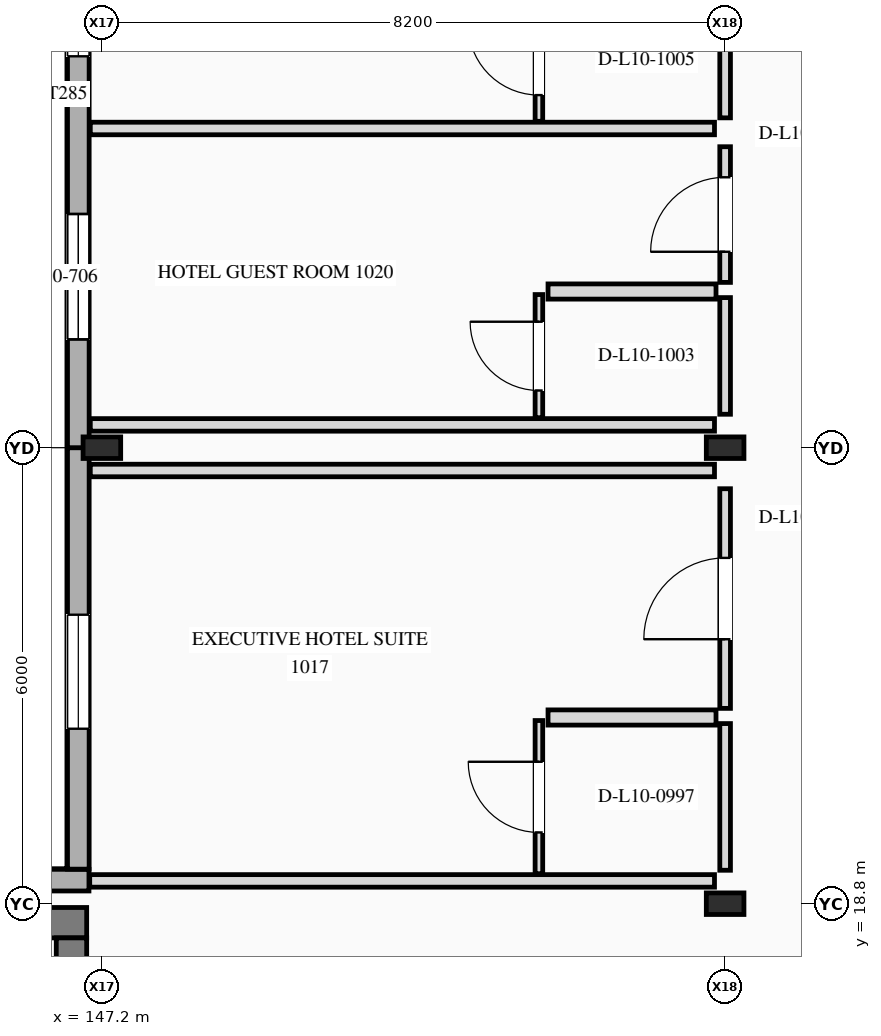
"""IFC4 building model, lengths in metres.
Left out: names, types, materials, properties, quantities, classifications, styles, units other than length and angle.
Written with IfcOpenShell. Run it as: python <this file> out.ifc"""

import sys

from ifc_helpers import new_model, si_unit, direction, frame, frame_2d, origin, origin_2d, place, context, subcontext, project, spatial, rectangle, i_section, extrude, element, fill, save


model = new_model("IFC4")
c1 = context("Model", 3, precision=1e-05, world=origin(), true_north=direction((0.0, 1.0)))
c2 = subcontext(c1, "Body", "Model", "MODEL_VIEW")
j1 = project(units=[si_unit("LENGTHUNIT", "METRE"), si_unit("PLANEANGLEUNIT", "RADIAN")], contexts=[c1])
p1 = place(None, origin())
s1 = spatial("IfcSite", under=j1, at=p1, CompositionType="ELEMENT")
p2 = place(p1, origin())
s2 = spatial("IfcBuilding", under=s1, at=p2, CompositionType="ELEMENT")
p3 = place(p2, frame((0.0, 0.0, 41.1)))
s3 = spatial("IfcBuildingStorey", under=s2, at=p3, CompositionType="ELEMENT", Elevation=41.1)
for number, where, z_axis, x_axis in (
    (1, (147.2, 24.8, 0.0), (0.0, 0.0, 1.0), (0.0, 1.0, 0.0)),
    (2, (155.4, 18.8, 0.0), (0.0, 0.0, 1.0), (0.0, 1.0, 0.0)),
    (3, (155.4, 24.8, 0.0), (0.0, 0.0, 1.0), (0.0, 1.0, 0.0)),
):
    element("IfcColumn", number, at=place(p3, frame(where, z_axis=z_axis, x_axis=x_axis)), inside=s3, PredefinedType="COLUMN", context=c2, shape_type="SweptSolid", body=[
        extrude(i_section(OverallWidth=0.284, OverallDepth=0.495, WebThickness=0.019, FlangeThickness=0.033, at=origin_2d()), origin(), (0.0, 0.0, 1.0), 3.5),
    ])
p4 = place(p3, frame((147.03, 19.11, 0.0), z_axis=(0.0, 0.0, 1.0), x_axis=(-1.0, 0.0, 0.0)))
e4 = element("IfcWall", 4, at=p4, inside=s3, PredefinedType="STANDARD", context=c2, shape_type="SweptSolid", body=[
    extrude(rectangle(XDim=11.03, YDim=0.285, at=frame_2d((5.515, 0.0))), origin(), (0.0, 0.0, 1.0), 3.5),
])
p5 = place(p3, frame((146.89, 19.254, 0.0), z_axis=(0.0, 0.0, 1.0), x_axis=(0.0, 1.0, 0.0)))
e5 = element("IfcWall", 5, at=p5, inside=s3, PredefinedType="STANDARD", context=c2, shape_type="SweptSolid", body=[
    extrude(rectangle(XDim=5.546, YDim=0.285, at=frame_2d((2.773, 0.0))), origin(), (0.0, 0.0, 1.0), 3.5),
])
p6 = place(p5, frame((1.848, 0.0, 0.85)))
e6 = element("IfcOpeningElement", 6, at=p6, cuts=e5, PredefinedType="OPENING", context=c2, shape_type="SweptSolid", body=[
    extrude(rectangle(XDim=1.5, YDim=1.7, at=frame_2d((0.75, 0.85))), frame((0.0, 0.152, 0.0), z_axis=(0.0, -1.0, 0.0), x_axis=(1.0, 0.0, 0.0)), (0.0, 0.0, 1.0), 0.305),
])
p7 = place(p3, frame((146.89, 24.8, 0.0), z_axis=(0.0, 0.0, 1.0), x_axis=(0.0, 1.0, 0.0)))
e7 = element("IfcWall", 7, at=p7, inside=s3, PredefinedType="STANDARD", context=c2, shape_type="SweptSolid", body=[
    extrude(rectangle(XDim=8.4, YDim=0.285, at=frame_2d((4.2, 0.0))), origin(), (0.0, 0.0, 1.0), 3.5),
])
p8 = place(p7, frame((1.425, 0.0, 0.85)))
e8 = element("IfcOpeningElement", 8, at=p8, cuts=e7, PredefinedType="OPENING", context=c2, shape_type="SweptSolid", body=[
    extrude(rectangle(XDim=1.65, YDim=1.75, at=frame_2d((0.825, 0.875))), frame((0.0, 0.152, 0.0), z_axis=(0.0, -1.0, 0.0), x_axis=(1.0, 0.0, 0.0)), (0.0, 0.0, 1.0), 0.305),
])
p9 = place(p7, frame((5.15, 0.0, 0.85)))
e9 = element("IfcOpeningElement", 9, at=p9, cuts=e7, PredefinedType="OPENING", context=c2, shape_type="SweptSolid", body=[
    extrude(rectangle(XDim=2.0, YDim=1.65, at=frame_2d((1.0, 0.825))), frame((0.0, 0.152, 0.0), z_axis=(0.0, -1.0, 0.0), x_axis=(1.0, 0.0, 0.0)), (0.0, 0.0, 1.0), 0.305),
])
p10 = place(p3, frame((147.0, 18.55, 0.0), z_axis=(0.0, 0.0, 1.0), x_axis=(-1.0, 0.0, 0.0)))
e10 = element("IfcWall", 10, at=p10, inside=s3, PredefinedType="SHEAR", context=c2, shape_type="SweptSolid", body=[
    extrude(rectangle(XDim=10.6, YDim=0.4, at=frame_2d((5.3, 0.0))), origin(), (0.0, 0.0, 1.0), 3.5),
])
p11 = place(p3, frame((146.8, 11.0, 0.0), z_axis=(0.0, 0.0, 1.0), x_axis=(0.0, 1.0, 0.0)))
e11 = element("IfcWall", 11, at=p11, inside=s3, PredefinedType="SHEAR", context=c2, shape_type="SweptSolid", body=[
    extrude(rectangle(XDim=7.35, YDim=0.4, at=frame_2d((3.675, 0.0))), origin(), (0.0, 0.0, 1.0), 3.5),
])
p12 = place(p11, frame((5.0, 0.0, 0.0)))
e12 = element("IfcOpeningElement", 12, at=p12, cuts=e11, PredefinedType="OPENING", context=c2, shape_type="SweptSolid", body=[
    extrude(rectangle(XDim=0.95, YDim=2.2, at=frame_2d((0.475, 1.1))), frame((0.0, 0.21, 0.0), z_axis=(0.0, -1.0, 0.0), x_axis=(1.0, 0.0, 0.0)), (0.0, 0.0, 1.0), 0.42),
])
p13 = place(p11, frame((0.175, 0.0, 0.0)))
e13 = element("IfcOpeningElement", 13, at=p13, cuts=e11, PredefinedType="OPENING", context=c2, shape_type="SweptSolid", body=[
    extrude(rectangle(XDim=1.15, YDim=2.25, at=frame_2d((0.575, 1.125))), frame((0.0, 0.21, 0.0), z_axis=(0.0, -1.0, 0.0), x_axis=(1.0, 0.0, 0.0)), (0.0, 0.0, 1.0), 0.42),
])
p14 = place(p11, frame((1.875, 0.0, 0.0)))
e14 = element("IfcOpeningElement", 14, at=p14, cuts=e11, PredefinedType="OPENING", context=c2, shape_type="SweptSolid", body=[
    extrude(rectangle(XDim=1.15, YDim=2.25, at=frame_2d((0.575, 1.125))), frame((0.0, 0.21, 0.0), z_axis=(0.0, -1.0, 0.0), x_axis=(1.0, 0.0, 0.0)), (0.0, 0.0, 1.0), 0.42),
])
p15 = place(p3, frame((155.4, 19.24, 0.0), z_axis=(0.0, 0.0, 1.0), x_axis=(0.0, 1.0, 0.0)))
e15 = element("IfcWall", 15, at=p15, inside=s3, PredefinedType="PARTITIONING", context=c2, shape_type="SweptSolid", body=[
    extrude(rectangle(XDim=1.93, YDim=0.14, at=frame_2d((0.965, 0.0))), origin(), (0.0, 0.0, 1.0), 2.654),
])
p16 = place(p3, frame((155.4, 21.37, 0.0), z_axis=(0.0, 0.0, 1.0), x_axis=(0.0, 1.0, 0.0)))
e16 = element("IfcWall", 16, at=p16, inside=s3, PredefinedType="PARTITIONING", context=c2, shape_type="SweptSolid", body=[
    extrude(rectangle(XDim=2.89, YDim=0.14, at=frame_2d((1.445, 0.0))), origin(), (0.0, 0.0, 1.0), 2.654),
])
p17 = place(p16, frame((0.91, 0.0, 0.0)))
e17 = element("IfcOpeningElement", 17, at=p17, cuts=e16, PredefinedType="OPENING", context=c2, shape_type="SweptSolid", body=[
    extrude(rectangle(XDim=1.07, YDim=2.25, at=frame_2d((0.535, 1.125))), frame((0.0, 0.08, 0.0), z_axis=(0.0, -1.0, 0.0), x_axis=(1.0, 0.0, 0.0)), (0.0, 0.0, 1.0), 0.16),
])
p18 = place(p3, frame((147.04, 19.1, 0.0), z_axis=(0.0, 0.0, 1.0), x_axis=(1.0, 0.0, 0.0)))
e18 = element("IfcWall", 18, at=p18, inside=s3, PredefinedType="PARTITIONING", context=c2, shape_type="SweptSolid", body=[
    extrude(rectangle(XDim=8.22, YDim=0.165, at=frame_2d((4.11, 0.0))), origin(), (0.0, 0.0, 1.0), 3.18),
])
p19 = place(p3, frame((147.048, 24.5, 0.0), z_axis=(0.0, 0.0, 1.0), x_axis=(1.0, 0.0, 0.0)))
e19 = element("IfcWall", 19, at=p19, inside=s3, PredefinedType="PARTITIONING", context=c2, shape_type="SweptSolid", body=[
    extrude(rectangle(XDim=8.212, YDim=0.165, at=frame_2d((4.106, 0.0))), origin(), (0.0, 0.0, 1.0), 2.593),
])
p20 = place(p3, frame((153.07, 21.25, 0.0), z_axis=(0.0, 0.0, 1.0), x_axis=(1.0, 0.0, 0.0)))
e20 = element("IfcWall", 20, at=p20, inside=s3, PredefinedType="PLUMBINGWALL", context=c2, shape_type="SweptSolid", body=[
    extrude(rectangle(XDim=2.21, YDim=0.2, at=frame_2d((1.105, 0.0))), origin(), (0.0, 0.0, 1.0), 3.18),
])
p21 = place(p3, frame((152.95, 19.195, 0.0), z_axis=(0.0, 0.0, 1.0), x_axis=(0.0, 1.0, 0.0)))
e21 = element("IfcWall", 21, at=p21, inside=s3, PredefinedType="PARTITIONING", context=c2, shape_type="SweptSolid", body=[
    extrude(rectangle(XDim=2.015, YDim=0.1, at=frame_2d((1.008, 0.0))), origin(), (0.0, 0.0, 1.0), 3.18),
])
p22 = place(p21, frame((0.543, 0.0, 0.0)))
e22 = element("IfcOpeningElement", 22, at=p22, cuts=e21, PredefinedType="OPENING", context=c2, shape_type="SweptSolid", body=[
    extrude(rectangle(XDim=0.93, YDim=2.14, at=frame_2d((0.465, 1.07))), frame((0.0, 0.06, 0.0), z_axis=(0.0, -1.0, 0.0), x_axis=(1.0, 0.0, 0.0)), (0.0, 0.0, 1.0), 0.12),
])
p23 = place(p3, frame((155.4, 25.24, 0.0), z_axis=(0.0, 0.0, 1.0), x_axis=(0.0, 1.0, 0.0)))
e23 = element("IfcWall", 23, at=p23, inside=s3, PredefinedType="PARTITIONING", context=c2, shape_type="SweptSolid", body=[
    extrude(rectangle(XDim=1.535, YDim=0.14, at=frame_2d((0.768, 0.0))), origin(), (0.0, 0.0, 1.0), 2.654),
])
p24 = place(p3, frame((155.4, 26.975, 0.0), z_axis=(0.0, 0.0, 1.0), x_axis=(0.0, 1.0, 0.0)))
e24 = element("IfcWall", 24, at=p24, inside=s3, PredefinedType="PARTITIONING", context=c2, shape_type="SweptSolid", body=[
    extrude(rectangle(XDim=1.785, YDim=0.14, at=frame_2d((0.893, 0.0))), origin(), (0.0, 0.0, 1.0), 2.654),
])
p25 = place(p24, frame((0.403, 0.0, 0.0)))
e25 = element("IfcOpeningElement", 25, at=p25, cuts=e24, PredefinedType="OPENING", context=c2, shape_type="SweptSolid", body=[
    extrude(rectangle(XDim=0.98, YDim=2.35, at=frame_2d((0.49, 1.175))), frame((0.0, 0.08, 0.0), z_axis=(0.0, -1.0, 0.0), x_axis=(1.0, 0.0, 0.0)), (0.0, 0.0, 1.0), 0.16),
])
p26 = place(p3, frame((147.048, 25.1, 0.0), z_axis=(0.0, 0.0, 1.0), x_axis=(1.0, 0.0, 0.0)))
e26 = element("IfcWall", 26, at=p26, inside=s3, PredefinedType="PARTITIONING", context=c2, shape_type="SweptSolid", body=[
    extrude(rectangle(XDim=8.212, YDim=0.165, at=frame_2d((4.106, 0.0))), origin(), (0.0, 0.0, 1.0), 2.593),
])
p27 = place(p3, frame((147.048, 29.0, 0.0), z_axis=(0.0, 0.0, 1.0), x_axis=(1.0, 0.0, 0.0)))
e27 = element("IfcWall", 27, at=p27, inside=s3, PredefinedType="PARTITIONING", context=c2, shape_type="SweptSolid", body=[
    extrude(rectangle(XDim=8.212, YDim=0.165, at=frame_2d((4.106, 0.0))), origin(), (0.0, 0.0, 1.0), 2.654),
])
p28 = place(p3, frame((153.07, 26.855, 0.0), z_axis=(0.0, 0.0, 1.0), x_axis=(1.0, 0.0, 0.0)))
e28 = element("IfcWall", 28, at=p28, inside=s3, PredefinedType="PLUMBINGWALL", context=c2, shape_type="SweptSolid", body=[
    extrude(rectangle(XDim=2.21, YDim=0.2, at=frame_2d((1.105, 0.0))), origin(), (0.0, 0.0, 1.0), 3.18),
])
p29 = place(p3, frame((152.95, 25.195, 0.0), z_axis=(0.0, 0.0, 1.0), x_axis=(0.0, 1.0, 0.0)))
e29 = element("IfcWall", 29, at=p29, inside=s3, PredefinedType="PARTITIONING", context=c2, shape_type="SweptSolid", body=[
    extrude(rectangle(XDim=1.62, YDim=0.1, at=frame_2d((0.81, 0.0))), origin(), (0.0, 0.0, 1.0), 2.788),
])
p30 = place(p29, frame((0.358, 0.0, 0.0)))
e30 = element("IfcOpeningElement", 30, at=p30, cuts=e29, PredefinedType="OPENING", context=c2, shape_type="SweptSolid", body=[
    extrude(rectangle(XDim=0.905, YDim=2.18, at=frame_2d((0.453, 1.09))), frame((0.0, 0.06, 0.0), z_axis=(0.0, -1.0, 0.0), x_axis=(1.0, 0.0, 0.0)), (0.0, 0.0, 1.0), 0.12),
])
p31 = place(p3, frame((155.4, 29.14, 0.0), z_axis=(0.0, 0.0, 1.0), x_axis=(0.0, 1.0, 0.0)))
e31 = element("IfcWall", 31, at=p31, inside=s3, PredefinedType="PARTITIONING", context=c2, shape_type="SweptSolid", body=[
    extrude(rectangle(XDim=1.535, YDim=0.14, at=frame_2d((0.768, 0.0))), origin(), (0.0, 0.0, 1.0), 2.654),
])
p32 = place(p3, frame((152.95, 29.094, 0.0), z_axis=(0.0, 0.0, 1.0), x_axis=(0.0, 1.0, 0.0)))
e32 = element("IfcWall", 32, at=p32, inside=s3, PredefinedType="PARTITIONING", context=c2, shape_type="SweptSolid", body=[
    extrude(rectangle(XDim=1.621, YDim=0.1, at=frame_2d((0.81, 0.0))), origin(), (0.0, 0.0, 1.0), 2.788),
])
p33 = place(p32, frame((0.345, 0.0, 0.0)))
e33 = element("IfcOpeningElement", 33, at=p33, cuts=e32, PredefinedType="OPENING", context=c2, shape_type="SweptSolid", body=[
    extrude(rectangle(XDim=0.93, YDim=2.22, at=frame_2d((0.465, 1.11))), frame((0.0, 0.06, 0.0), z_axis=(0.0, -1.0, 0.0), x_axis=(1.0, 0.0, 0.0)), (0.0, 0.0, 1.0), 0.12),
])
p34 = place(p6, origin())
e34 = element("IfcWindow", 34, at=p34, inside=s3, PartitioningType="SINGLE_PANEL", PredefinedType="WINDOW", context=c2, shape_type="SweptSolid", body=[
    extrude(rectangle(XDim=1.5, YDim=1.7, at=frame_2d((0.75, 0.85))), frame((0.0, 0.03, 0.0), z_axis=(0.0, -1.0, 0.0), x_axis=(1.0, 0.0, 0.0)), (0.0, 0.0, 1.0), 0.06),
])
fill(e6, e34)
p35 = place(p8, origin())
e35 = element("IfcWindow", 35, at=p35, inside=s3, PartitioningType="SINGLE_PANEL", PredefinedType="WINDOW", context=c2, shape_type="SweptSolid", body=[
    extrude(rectangle(XDim=1.65, YDim=1.75, at=frame_2d((0.825, 0.875))), frame((0.0, 0.03, 0.0), z_axis=(0.0, -1.0, 0.0), x_axis=(1.0, 0.0, 0.0)), (0.0, 0.0, 1.0), 0.06),
])
fill(e8, e35)
p36 = place(p9, origin())
e36 = element("IfcWindow", 36, at=p36, inside=s3, PartitioningType="SINGLE_PANEL", PredefinedType="WINDOW", context=c2, shape_type="SweptSolid", body=[
    extrude(rectangle(XDim=2.0, YDim=1.65, at=frame_2d((1.0, 0.825))), frame((0.0, 0.03, 0.0), z_axis=(0.0, -1.0, 0.0), x_axis=(1.0, 0.0, 0.0)), (0.0, 0.0, 1.0), 0.06),
])
fill(e9, e36)
p37 = place(p17, origin())
e37 = element("IfcDoor", 37, at=p37, inside=s3, OperationType="SINGLE_SWING_LEFT", PredefinedType="DOOR", context=c2, shape_type="SweptSolid", body=[
    extrude(rectangle(XDim=1.07, YDim=2.25, at=frame_2d((0.535, 1.125))), frame((0.0, 0.025, 0.0), z_axis=(0.0, -1.0, 0.0), x_axis=(1.0, 0.0, 0.0)), (0.0, 0.0, 1.0), 0.05),
])
fill(e17, e37)
p38 = place(p22, origin())
e38 = element("IfcDoor", 38, at=p38, inside=s3, OperationType="SINGLE_SWING_RIGHT", PredefinedType="DOOR", context=c2, shape_type="SweptSolid", body=[
    extrude(rectangle(XDim=0.93, YDim=2.14, at=frame_2d((0.465, 1.07))), frame((0.0, 0.025, 0.0), z_axis=(0.0, -1.0, 0.0), x_axis=(1.0, 0.0, 0.0)), (0.0, 0.0, 1.0), 0.05),
])
fill(e22, e38)
p39 = place(p25, origin())
e39 = element("IfcDoor", 39, at=p39, inside=s3, OperationType="SINGLE_SWING_LEFT", PredefinedType="DOOR", context=c2, shape_type="SweptSolid", body=[
    extrude(rectangle(XDim=0.98, YDim=2.35, at=frame_2d((0.49, 1.175))), frame((0.0, 0.025, 0.0), z_axis=(0.0, -1.0, 0.0), x_axis=(1.0, 0.0, 0.0)), (0.0, 0.0, 1.0), 0.05),
])
fill(e25, e39)
p40 = place(p30, origin())
e40 = element("IfcDoor", 40, at=p40, inside=s3, OperationType="SINGLE_SWING_RIGHT", PredefinedType="DOOR", context=c2, shape_type="SweptSolid", body=[
    extrude(rectangle(XDim=0.905, YDim=2.18, at=frame_2d((0.453, 1.09))), frame((0.0, 0.025, 0.0), z_axis=(0.0, -1.0, 0.0), x_axis=(1.0, 0.0, 0.0)), (0.0, 0.0, 1.0), 0.05),
])
fill(e30, e40)
p41 = place(p33, origin())
e41 = element("IfcDoor", 41, at=p41, inside=s3, OperationType="SINGLE_SWING_RIGHT", PredefinedType="DOOR", context=c2, shape_type="SweptSolid", body=[
    extrude(rectangle(XDim=0.93, YDim=2.22, at=frame_2d((0.465, 1.11))), frame((0.0, 0.025, 0.0), z_axis=(0.0, -1.0, 0.0), x_axis=(1.0, 0.0, 0.0)), (0.0, 0.0, 1.0), 0.05),
])
fill(e33, e41)
save(model, sys.argv[1])
